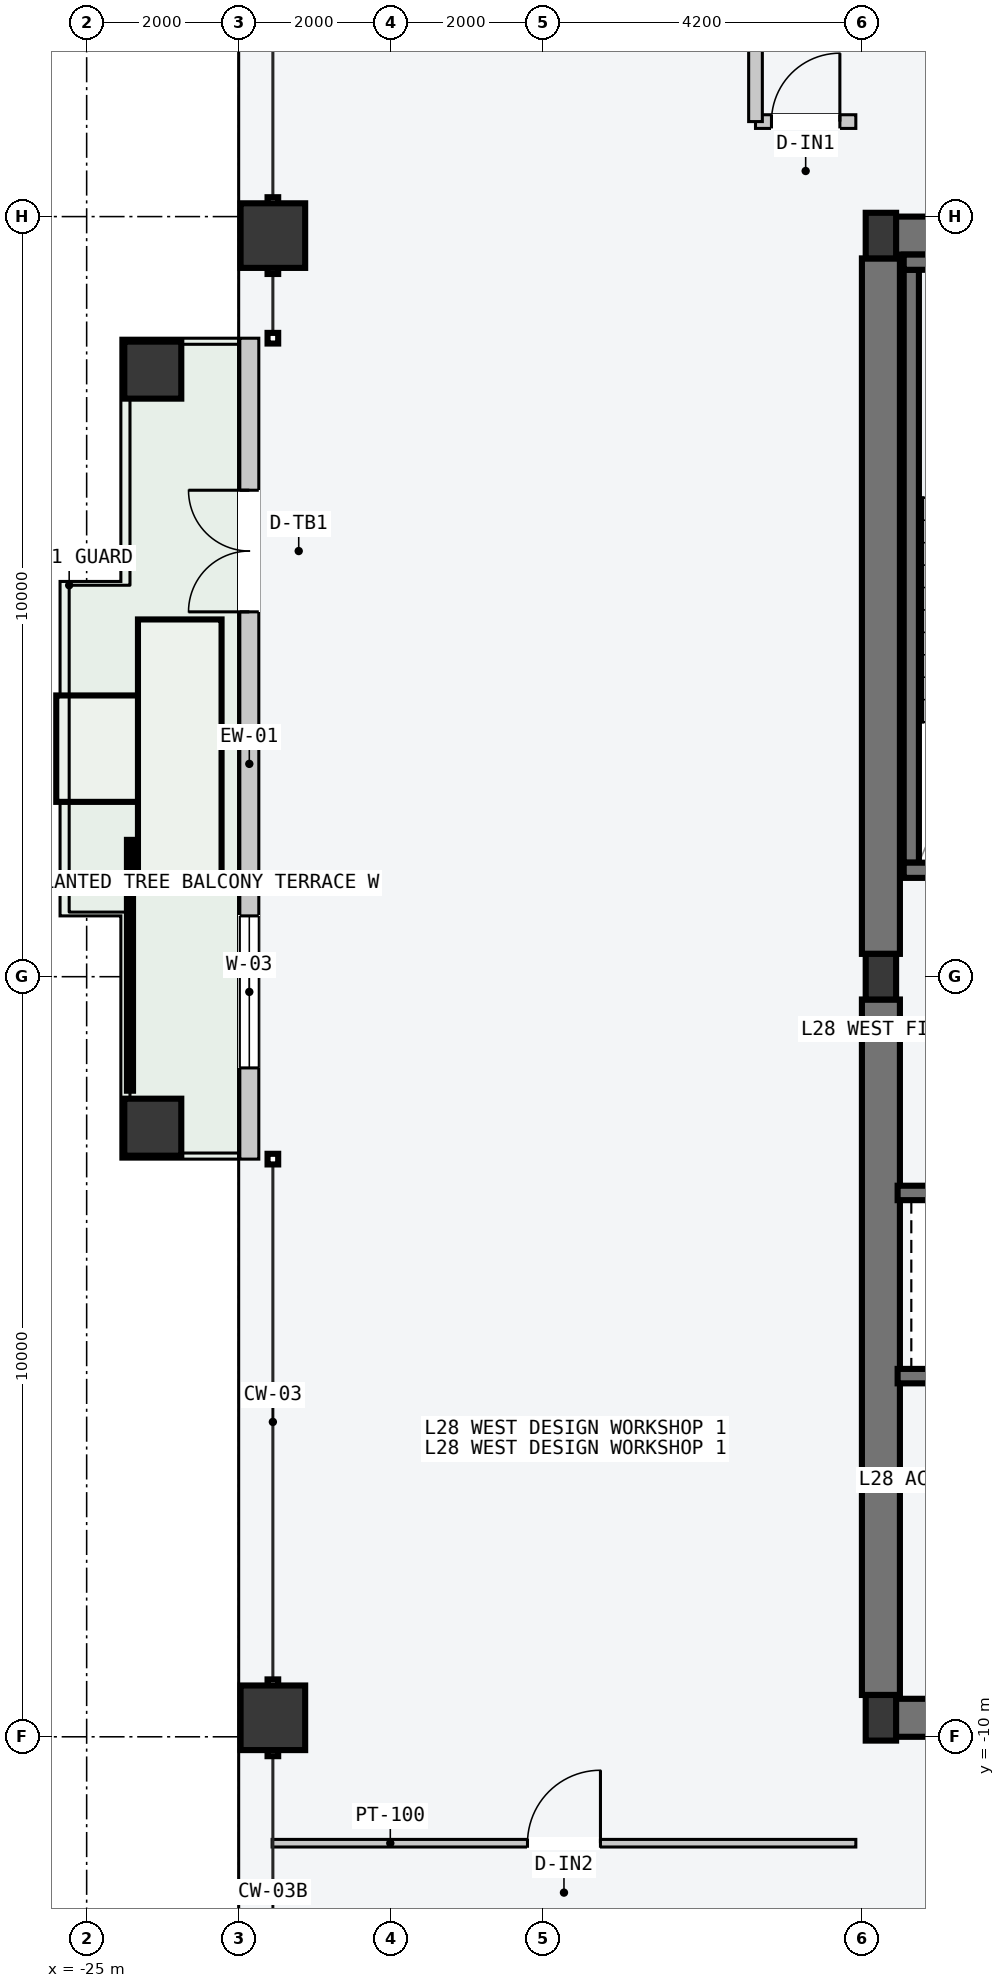
"""IFC4 building model, lengths in metres.
Left out: names, types, materials, properties, quantities, classifications, styles, units other than length and angle.
Written with IfcOpenShell. Run it as: python <this file> out.ifc"""

import sys

from ifc_helpers import new_model, si_unit, direction, frame, frame_2d, origin, origin_2d, place, context, subcontext, project, spatial, rectangle, hollow_rectangle, i_section, extrude, element, fill, save


model = new_model("IFC4")
c1 = context("Model", 3, precision=1e-05, world=origin(), true_north=direction((0.0, 1.0)))
c2 = subcontext(c1, "Body", "Model", "MODEL_VIEW")
j1 = project(units=[si_unit("LENGTHUNIT", "METRE"), si_unit("PLANEANGLEUNIT", "RADIAN")], contexts=[c1])
p1 = place(None, origin())
s1 = spatial("IfcSite", under=j1, at=p1, CompositionType="ELEMENT")
p2 = place(p1, origin())
s2 = spatial("IfcBuilding", under=s1, at=p2, CompositionType="ELEMENT")
p3 = place(p2, frame((0.0, 0.0, 109.8)))
s3 = spatial("IfcBuildingStorey", under=s2, at=p3, CompositionType="ELEMENT", Elevation=109.8)
for number, where, z_axis, x_axis in (
    (1, (-14.53, -9.75, -0.2), (0.0, 0.0, 1.0), (1.0, 0.0, 0.0)),
    (2, (-14.53, 9.75, -0.2), (0.0, 0.0, 1.0), (1.0, 0.0, 0.0)),
):
    element("IfcWall", number, at=place(p3, frame(where, z_axis=z_axis, x_axis=x_axis)), inside=s3, PredefinedType="SHEAR", context=c2, shape_type="SweptSolid", body=[
        extrude(rectangle(XDim=6.46, YDim=0.5, at=frame_2d((3.23, 0.0))), origin(), (0.0, 0.0, 1.0), 3.6),
    ])
for number, where, z_axis, x_axis in (
    (3, (-14.55, -9.45, -0.2), (0.0, 0.0, 1.0), (0.0, 1.0, 0.0)),
    (4, (-14.55, 0.3, -0.2), (0.0, 0.0, 1.0), (0.0, 1.0, 0.0)),
):
    element("IfcWall", number, at=place(p3, frame(where, z_axis=z_axis, x_axis=x_axis)), inside=s3, PredefinedType="SHEAR", context=c2, shape_type="SweptSolid", body=[
        extrude(rectangle(XDim=9.15, YDim=0.5, at=frame_2d((4.575, 0.0))), origin(), (0.0, 0.0, 1.0), 3.6),
    ])
p4 = place(p3, frame((-14.15, 1.5, -0.2), z_axis=(0.0, 0.0, 1.0), x_axis=(0.0, 1.0, 0.0)))
e5 = element("IfcWall", 5, at=p4, inside=s3, PredefinedType="SOLIDWALL", context=c2, shape_type="SweptSolid", body=[
    extrude(rectangle(XDim=7.8, YDim=0.2, at=frame_2d((3.9, 0.0))), origin(), (0.0, 0.0, 1.0), 3.6),
])
p5 = place(p3, frame((-14.25, 1.4, -0.2), z_axis=(0.0, 0.0, 1.0), x_axis=(1.0, 0.0, 0.0)))
e6 = element("IfcWall", 6, at=p5, inside=s3, PredefinedType="SOLIDWALL", context=c2, shape_type="SweptSolid", body=[
    extrude(rectangle(XDim=3.72, YDim=0.2, at=frame_2d((1.86, 0.0))), origin(), (0.0, 0.0, 1.0), 3.6),
])
p6 = place(p5, frame((1.5, 0.0, 0.2)))
e7 = element("IfcOpeningElement", 7, at=p6, cuts=e6, PredefinedType="OPENING", context=c2, shape_type="SweptSolid", body=[
    extrude(rectangle(XDim=1.12, YDim=2.18, at=frame_2d((0.56, 1.09))), frame((0.0, 0.11, 0.0), z_axis=(0.0, -1.0, 0.0), x_axis=(1.0, 0.0, 0.0)), (0.0, 0.0, 1.0), 0.22),
])
p7 = place(p3, frame((-14.25, 9.4, -0.2), z_axis=(0.0, 0.0, 1.0), x_axis=(1.0, 0.0, 0.0)))
e8 = element("IfcWall", 8, at=p7, inside=s3, PredefinedType="SOLIDWALL", context=c2, shape_type="SweptSolid", body=[
    extrude(rectangle(XDim=3.72, YDim=0.2, at=frame_2d((1.86, 0.0))), origin(), (0.0, 0.0, 1.0), 3.6),
])
for number, where, z_axis, x_axis in (
    (9, (-14.55, -9.75, 0.0), (0.0, 0.0, 1.0), (1.0, 0.0, 0.0)),
    (10, (-14.55, 0.0, 0.0), (0.0, 0.0, 1.0), (1.0, 0.0, 0.0)),
    (11, (-14.55, 9.75, 0.0), (0.0, 0.0, 1.0), (1.0, 0.0, 0.0)),
):
    element("IfcColumn", number, at=place(p3, frame(where, z_axis=z_axis, x_axis=x_axis)), inside=s3, PredefinedType="COLUMN", context=c2, shape_type="SweptSolid", body=[
        extrude(i_section(OverallWidth=0.4, OverallDepth=0.6, WebThickness=0.022, FlangeThickness=0.036, at=origin_2d()), origin(), (0.0, 0.0, 1.0), 3.6),
    ])
for number, where, z_axis, x_axis in (
    (12, (-22.55, -9.75, 0.0), (0.0, 0.0, 1.0), (0.0, 1.0, 0.0)),
    (13, (-22.55, 9.75, 0.0), (0.0, 0.0, 1.0), (0.0, 1.0, 0.0)),
):
    element("IfcColumn", number, at=place(p3, frame(where, z_axis=z_axis, x_axis=x_axis)), inside=s3, PredefinedType="COLUMN", context=c2, shape_type="SweptSolid", body=[
        extrude(hollow_rectangle(XDim=0.85, YDim=0.85, WallThickness=0.04, at=origin_2d()), origin(), (0.0, 0.0, 1.0), 3.6),
    ])
for number, where, z_axis, x_axis in (
    (14, (-24.13, -1.98, 0.0), (0.0, 0.0, 1.0), (0.0, 1.0, 0.0)),
    (15, (-24.13, 7.98, 0.0), (0.0, 0.0, 1.0), (0.0, 1.0, 0.0)),
):
    element("IfcColumn", number, at=place(p3, frame(where, z_axis=z_axis, x_axis=x_axis)), inside=s3, PredefinedType="COLUMN", context=c2, shape_type="SweptSolid", body=[
        extrude(hollow_rectangle(XDim=0.75, YDim=0.75, WallThickness=0.032, at=origin_2d()), origin(), (0.0, 0.0, 1.0), 3.6),
    ])
p8 = place(p3, frame((-22.86, -2.4, 0.0), z_axis=(0.0, 0.0, 1.0), x_axis=(0.0, 1.0, 0.0)))
e16 = element("IfcWall", 16, at=p8, inside=s3, PredefinedType="STANDARD", context=c2, shape_type="SweptSolid", body=[
    extrude(rectangle(XDim=10.8, YDim=0.25, at=frame_2d((5.4, 0.0))), origin(), (0.0, 0.0, 1.0), 3.4),
])
p9 = place(p8, frame((7.2, 0.0, 0.0)))
e17 = element("IfcOpeningElement", 17, at=p9, cuts=e16, PredefinedType="OPENING", context=c2, shape_type="SweptSolid", body=[
    extrude(rectangle(XDim=1.6, YDim=2.2, at=frame_2d((0.8, 1.1))), frame((0.0, 0.135, 0.0), z_axis=(0.0, -1.0, 0.0), x_axis=(1.0, 0.0, 0.0)), (0.0, 0.0, 1.0), 0.27),
])
p10 = place(p8, frame((1.2, 0.0, 0.85)))
e18 = element("IfcOpeningElement", 18, at=p10, cuts=e16, PredefinedType="OPENING", context=c2, shape_type="SweptSolid", body=[
    extrude(rectangle(XDim=2.0, YDim=2.1, at=frame_2d((1.0, 1.05))), frame((0.0, 0.135, 0.0), z_axis=(0.0, -1.0, 0.0), x_axis=(1.0, 0.0, 0.0)), (0.0, 0.0, 1.0), 0.27),
])
p11 = place(p3, frame((-14.33, -2.845, -0.2), z_axis=(0.0, 0.0, 1.0), x_axis=(1.0, 0.0, 0.0)))
e19 = element("IfcWall", 19, at=p11, inside=s3, PredefinedType="SOLIDWALL", context=c2, shape_type="SweptSolid", body=[
    extrude(rectangle(XDim=2.68, YDim=0.19, at=frame_2d((1.34, 0.0))), origin(), (0.0, 0.0, 1.0), 3.6),
])
p12 = place(p11, frame((0.83, 0.0, 0.2)))
e20 = element("IfcOpeningElement", 20, at=p12, cuts=e19, PredefinedType="OPENING", context=c2, shape_type="SweptSolid", body=[
    extrude(rectangle(XDim=1.2, YDim=2.2, at=frame_2d((0.6, 1.1))), frame((0.0, 0.105, 0.0), z_axis=(0.0, -1.0, 0.0), x_axis=(1.0, 0.0, 0.0)), (0.0, 0.0, 1.0), 0.21),
])
p13 = place(p3, frame((-14.33, -5.255, -0.2), z_axis=(0.0, 0.0, 1.0), x_axis=(1.0, 0.0, 0.0)))
e21 = element("IfcWall", 21, at=p13, inside=s3, PredefinedType="SOLIDWALL", context=c2, shape_type="SweptSolid", body=[
    extrude(rectangle(XDim=2.68, YDim=0.19, at=frame_2d((1.34, 0.0))), origin(), (0.0, 0.0, 1.0), 3.6),
])
p14 = place(p3, frame((-22.56, -11.4, 0.0), z_axis=(0.0, 0.0, 1.0), x_axis=(1.0, 0.0, 0.0)))
e22 = element("IfcWall", 22, at=p14, inside=s3, PredefinedType="PARTITIONING", context=c2, shape_type="SweptSolid", body=[
    extrude(rectangle(XDim=7.68, YDim=0.1, at=frame_2d((3.84, 0.0))), origin(), (0.0, 0.0, 1.0), 3.4),
])
p15 = place(p14, frame((3.36, 0.0, 0.0)))
e23 = element("IfcOpeningElement", 23, at=p15, cuts=e22, PredefinedType="OPENING", context=c2, shape_type="SweptSolid", body=[
    extrude(rectangle(XDim=0.96, YDim=2.18, at=frame_2d((0.48, 1.09))), frame((0.0, 0.06, 0.0), z_axis=(0.0, -1.0, 0.0), x_axis=(1.0, 0.0, 0.0)), (0.0, 0.0, 1.0), 0.12),
])
p16 = place(p3, frame((-16.2, 11.25, 0.0), z_axis=(0.0, 0.0, 1.0), x_axis=(1.0, 0.0, 0.0)))
e24 = element("IfcWall", 24, at=p16, inside=s3, PredefinedType="PARTITIONING", context=c2, shape_type="SweptSolid", body=[
    extrude(rectangle(XDim=1.32, YDim=0.18, at=frame_2d((0.66, 0.0))), origin(), (0.0, 0.0, 1.0), 3.4),
])
p17 = place(p16, frame((0.21, 0.0, 0.0)))
e25 = element("IfcOpeningElement", 25, at=p17, cuts=e24, PredefinedType="OPENING", context=c2, shape_type="SweptSolid", body=[
    extrude(rectangle(XDim=0.9, YDim=2.15, at=frame_2d((0.45, 1.075))), frame((0.0, 0.1, 0.0), z_axis=(0.0, -1.0, 0.0), x_axis=(1.0, 0.0, 0.0)), (0.0, 0.0, 1.0), 0.2),
])
p18 = place(p3, frame((-16.2, 11.25, 0.0), z_axis=(0.0, 0.0, 1.0), x_axis=(0.0, 1.0, 0.0)))
e26 = element("IfcWall", 26, at=p18, inside=s3, PredefinedType="PARTITIONING", context=c2, shape_type="SweptSolid", body=[
    extrude(rectangle(XDim=1.95, YDim=0.18, at=frame_2d((0.975, 0.0))), origin(), (0.0, 0.0, 1.0), 3.4),
])
p19 = place(p9, origin())
e27 = element("IfcDoor", 27, at=p19, inside=s3, OperationType="DOUBLE_DOOR_SINGLE_SWING", PredefinedType="DOOR", context=c2, shape_type="SweptSolid", body=[
    extrude(rectangle(XDim=1.6, YDim=2.2, at=frame_2d((0.8, 1.1))), frame((0.0, 0.025, 0.0), z_axis=(0.0, -1.0, 0.0), x_axis=(1.0, 0.0, 0.0)), (0.0, 0.0, 1.0), 0.05),
])
fill(e17, e27)
p20 = place(p10, origin())
e28 = element("IfcWindow", 28, at=p20, inside=s3, PartitioningType="SINGLE_PANEL", PredefinedType="WINDOW", context=c2, shape_type="SweptSolid", body=[
    extrude(rectangle(XDim=2.0, YDim=2.1, at=frame_2d((1.0, 1.05))), frame((0.0, 0.03, 0.0), z_axis=(0.0, -1.0, 0.0), x_axis=(1.0, 0.0, 0.0)), (0.0, 0.0, 1.0), 0.06),
])
fill(e18, e28)
p21 = place(p15, origin())
e29 = element("IfcDoor", 29, at=p21, inside=s3, OperationType="SINGLE_SWING_RIGHT", PredefinedType="DOOR", context=c2, shape_type="SweptSolid", body=[
    extrude(rectangle(XDim=0.96, YDim=2.18, at=frame_2d((0.48, 1.09))), frame((0.0, 0.025, 0.0), z_axis=(0.0, -1.0, 0.0), x_axis=(1.0, 0.0, 0.0)), (0.0, 0.0, 1.0), 0.05),
])
fill(e23, e29)
p22 = place(p17, origin())
e30 = element("IfcDoor", 30, at=p22, inside=s3, OperationType="SINGLE_SWING_RIGHT", PredefinedType="DOOR", context=c2, shape_type="SweptSolid", body=[
    extrude(rectangle(XDim=0.9, YDim=2.15, at=frame_2d((0.45, 1.075))), frame((0.0, 0.025, 0.0), z_axis=(0.0, -1.0, 0.0), x_axis=(1.0, 0.0, 0.0)), (0.0, 0.0, 1.0), 0.05),
])
fill(e25, e30)
save(model, sys.argv[1])
